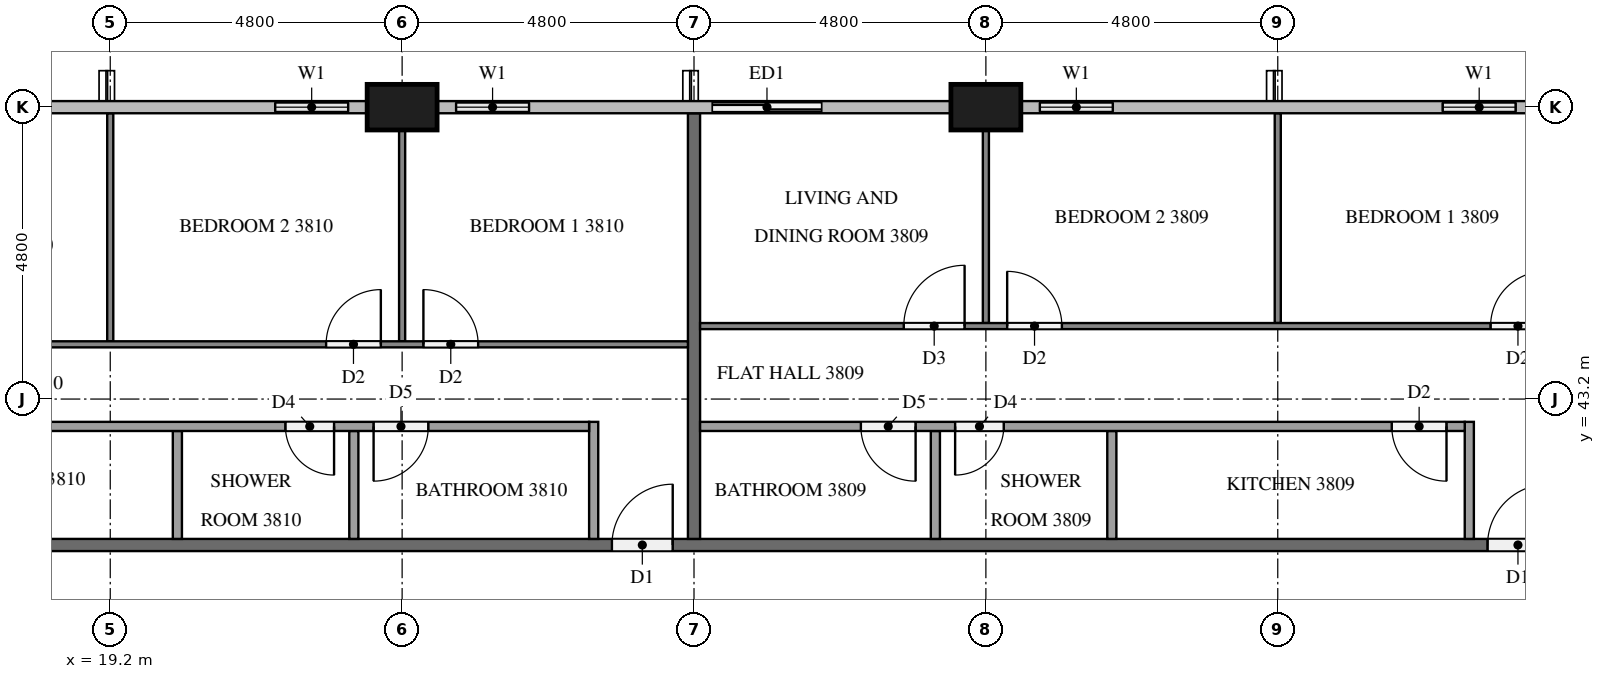
"""IFC4 building model, lengths in metres.
Left out: names, types, materials, properties, quantities, classifications, styles, units other than length and angle.
Written with IfcOpenShell. Run it as: python <this file> out.ifc"""

import sys

from ifc_helpers import new_model, si_unit, direction, frame, frame_2d, origin, origin_2d, place, context, subcontext, project, spatial, rectangle, extrude, element, fill, save


model = new_model("IFC4")
c1 = context("Model", 3, precision=1e-05, world=origin(), true_north=direction((0.0, 1.0)))
c2 = subcontext(c1, "Body", "Model", "MODEL_VIEW")
j1 = project(units=[si_unit("LENGTHUNIT", "METRE"), si_unit("PLANEANGLEUNIT", "RADIAN")], contexts=[c1])
p1 = place(None, origin())
s1 = spatial("IfcSite", under=j1, at=p1, CompositionType="ELEMENT")
p2 = place(p1, origin())
s2 = spatial("IfcBuilding", under=s1, at=p2, CompositionType="ELEMENT")
p3 = place(p2, frame((0.0, 0.0, 149.0)))
s3 = spatial("IfcBuildingStorey", under=s2, at=p3, CompositionType="ELEMENT", Elevation=149.0)
for number, where, z_axis, x_axis in (
    (1, (33.6, 48.0, 0.0), (0.0, 0.0, 1.0), (1.0, 0.0, 0.0)),
    (2, (24.0, 48.0, 0.0), (0.0, 0.0, 1.0), (1.0, 0.0, 0.0)),
):
    element("IfcColumn", number, at=place(p3, frame(where, z_axis=z_axis, x_axis=x_axis)), inside=s3, PredefinedType="COLUMN", context=c2, shape_type="SweptSolid", body=[
        extrude(rectangle(XDim=1.15, YDim=0.75, at=origin_2d()), origin(), (0.0, 0.0, 1.0), 3.2),
    ])
p4 = place(p3, frame((42.625, 48.0, 0.0), z_axis=(0.0, 0.0, 1.0), x_axis=(-1.0, 0.0, 0.0)))
e3 = element("IfcWall", 3, at=p4, inside=s3, PredefinedType="SOLIDWALL", context=c2, shape_type="SweptSolid", body=[
    extrude(rectangle(XDim=1.825, YDim=0.15, at=frame_2d((0.913, 0.0))), origin(), (0.0, 0.0, 1.0), 3.2),
])
p5 = place(p4, frame((0.312, 0.0, 0.9)))
e4 = element("IfcOpeningElement", 4, at=p5, cuts=e3, PredefinedType="OPENING", context=c2, shape_type="SweptSolid", body=[
    extrude(rectangle(XDim=1.2, YDim=1.4, at=frame_2d((0.6, 0.7))), frame((0.0, 0.085, 0.0), z_axis=(0.0, -1.0, 0.0), x_axis=(1.0, 0.0, 0.0)), (0.0, 0.0, 1.0), 0.17),
])
p6 = place(p3, frame((36.0, 48.0, 0.0), z_axis=(0.0, 0.0, 1.0), x_axis=(-1.0, 0.0, 0.0)))
e5 = element("IfcWall", 5, at=p6, inside=s3, PredefinedType="SOLIDWALL", context=c2, shape_type="SweptSolid", body=[
    extrude(rectangle(XDim=1.825, YDim=0.15, at=frame_2d((0.913, 0.0))), origin(), (0.0, 0.0, 1.0), 3.2),
])
p7 = place(p6, frame((0.312, 0.0, 0.9)))
e6 = element("IfcOpeningElement", 6, at=p7, cuts=e5, PredefinedType="OPENING", context=c2, shape_type="SweptSolid", body=[
    extrude(rectangle(XDim=1.2, YDim=1.4, at=frame_2d((0.6, 0.7))), frame((0.0, 0.085, 0.0), z_axis=(0.0, -1.0, 0.0), x_axis=(1.0, 0.0, 0.0)), (0.0, 0.0, 1.0), 0.17),
])
p8 = place(p3, frame((31.2, 48.0, 0.0), z_axis=(0.0, 0.0, 1.0), x_axis=(-1.0, 0.0, 0.0)))
e7 = element("IfcWall", 7, at=p8, inside=s3, PredefinedType="SOLIDWALL", context=c2, shape_type="SweptSolid", body=[
    extrude(rectangle(XDim=2.4, YDim=0.15, at=frame_2d((1.2, 0.0))), origin(), (0.0, 0.0, 1.0), 3.2),
])
p9 = place(p8, frame((0.3, 0.0, 0.0)))
e8 = element("IfcOpeningElement", 8, at=p9, cuts=e7, PredefinedType="OPENING", context=c2, shape_type="SweptSolid", body=[
    extrude(rectangle(XDim=1.8, YDim=2.4, at=frame_2d((0.9, 1.2))), frame((0.0, 0.085, 0.0), z_axis=(0.0, -1.0, 0.0), x_axis=(1.0, 0.0, 0.0)), (0.0, 0.0, 1.0), 0.17),
])
p10 = place(p3, frame((26.4, 48.0, 0.0), z_axis=(0.0, 0.0, 1.0), x_axis=(-1.0, 0.0, 0.0)))
e9 = element("IfcWall", 9, at=p10, inside=s3, PredefinedType="SOLIDWALL", context=c2, shape_type="SweptSolid", body=[
    extrude(rectangle(XDim=1.825, YDim=0.15, at=frame_2d((0.913, 0.0))), origin(), (0.0, 0.0, 1.0), 3.2),
])
p11 = place(p10, frame((0.312, 0.0, 0.9)))
e10 = element("IfcOpeningElement", 10, at=p11, cuts=e9, PredefinedType="OPENING", context=c2, shape_type="SweptSolid", body=[
    extrude(rectangle(XDim=1.2, YDim=1.4, at=frame_2d((0.6, 0.7))), frame((0.0, 0.085, 0.0), z_axis=(0.0, -1.0, 0.0), x_axis=(1.0, 0.0, 0.0)), (0.0, 0.0, 1.0), 0.17),
])
p12 = place(p3, frame((23.425, 48.0, 0.0), z_axis=(0.0, 0.0, 1.0), x_axis=(-1.0, 0.0, 0.0)))
e11 = element("IfcWall", 11, at=p12, inside=s3, PredefinedType="SOLIDWALL", context=c2, shape_type="SweptSolid", body=[
    extrude(rectangle(XDim=1.825, YDim=0.15, at=frame_2d((0.913, 0.0))), origin(), (0.0, 0.0, 1.0), 3.2),
])
p13 = place(p12, frame((0.312, 0.0, 0.9)))
e12 = element("IfcOpeningElement", 12, at=p13, cuts=e11, PredefinedType="OPENING", context=c2, shape_type="SweptSolid", body=[
    extrude(rectangle(XDim=1.2, YDim=1.4, at=frame_2d((0.6, 0.7))), frame((0.0, 0.085, 0.0), z_axis=(0.0, -1.0, 0.0), x_axis=(1.0, 0.0, 0.0)), (0.0, 0.0, 1.0), 0.17),
])
p14 = place(p3, frame((11.9, 40.8, 0.0), z_axis=(0.0, 0.0, 1.0), x_axis=(1.0, 0.0, 0.0)))
e13 = element("IfcWall", 13, at=p14, inside=s3, PredefinedType="PARTITIONING", context=c2, shape_type="SweptSolid", body=[
    extrude(rectangle(XDim=38.6, YDim=0.2, at=frame_2d((19.3, 0.0))), origin(), (0.0, 0.0, 1.0), 3.2),
])
p15 = place(p14, frame((31.65, 0.0, 0.0)))
e14 = element("IfcOpeningElement", 14, at=p15, cuts=e13, PredefinedType="OPENING", context=c2, shape_type="SweptSolid", body=[
    extrude(rectangle(XDim=1.0, YDim=2.1, at=frame_2d((0.5, 1.05))), frame((0.0, 0.11, 0.0), z_axis=(0.0, -1.0, 0.0), x_axis=(1.0, 0.0, 0.0)), (0.0, 0.0, 1.0), 0.22),
])
p16 = place(p14, frame((29.95, 0.0, 0.0)))
e15 = element("IfcOpeningElement", 15, at=p16, cuts=e13, PredefinedType="OPENING", context=c2, shape_type="SweptSolid", body=[
    extrude(rectangle(XDim=1.0, YDim=2.1, at=frame_2d((0.5, 1.05))), frame((0.0, 0.11, 0.0), z_axis=(0.0, -1.0, 0.0), x_axis=(1.0, 0.0, 0.0)), (0.0, 0.0, 1.0), 0.22),
])
p17 = place(p14, frame((15.55, 0.0, 0.0)))
e16 = element("IfcOpeningElement", 16, at=p17, cuts=e13, PredefinedType="OPENING", context=c2, shape_type="SweptSolid", body=[
    extrude(rectangle(XDim=1.0, YDim=2.1, at=frame_2d((0.5, 1.05))), frame((0.0, 0.11, 0.0), z_axis=(0.0, -1.0, 0.0), x_axis=(1.0, 0.0, 0.0)), (0.0, 0.0, 1.0), 0.22),
])
p18 = place(p14, frame((1.15, 0.0, 0.0)))
e17 = element("IfcOpeningElement", 17, at=p18, cuts=e13, PredefinedType="OPENING", context=c2, shape_type="SweptSolid", body=[
    extrude(rectangle(XDim=1.0, YDim=2.1, at=frame_2d((0.5, 1.05))), frame((0.0, 0.11, 0.0), z_axis=(0.0, -1.0, 0.0), x_axis=(1.0, 0.0, 0.0)), (0.0, 0.0, 1.0), 0.22),
])
p19 = place(p3, frame((28.8, 47.9, 0.0), z_axis=(0.0, 0.0, 1.0), x_axis=(0.0, -1.0, 0.0)))
e18 = element("IfcWall", 18, at=p19, inside=s3, PredefinedType="PARTITIONING", context=c2, shape_type="SweptSolid", body=[
    extrude(rectangle(XDim=7.0, YDim=0.2, at=frame_2d((3.5, 0.0))), origin(), (0.0, 0.0, 1.0), 3.2),
])
p20 = place(p3, frame((38.4, 44.45, 0.0), z_axis=(0.0, 0.0, 1.0), x_axis=(0.0, 1.0, 0.0)))
e19 = element("IfcWall", 19, at=p20, inside=s3, PredefinedType="PARTITIONING", context=c2, shape_type="SweptSolid", body=[
    extrude(rectangle(XDim=3.45, YDim=0.1, at=frame_2d((1.725, 0.0))), origin(), (0.0, 0.0, 1.0), 3.2),
])
p21 = place(p3, frame((33.6, 44.45, 0.0), z_axis=(0.0, 0.0, 1.0), x_axis=(0.0, 1.0, 0.0)))
e20 = element("IfcWall", 20, at=p21, inside=s3, PredefinedType="PARTITIONING", context=c2, shape_type="SweptSolid", body=[
    extrude(rectangle(XDim=3.175, YDim=0.1, at=frame_2d((1.587, 0.0))), origin(), (0.0, 0.0, 1.0), 3.2),
])
p22 = place(p3, frame((28.9, 44.4, 0.0), z_axis=(0.0, 0.0, 1.0), x_axis=(1.0, 0.0, 0.0)))
e21 = element("IfcWall", 21, at=p22, inside=s3, PredefinedType="PARTITIONING", context=c2, shape_type="SweptSolid", body=[
    extrude(rectangle(XDim=14.2, YDim=0.1, at=frame_2d((7.1, 0.0))), origin(), (0.0, 0.0, 1.0), 3.2),
])
p23 = place(p22, frame((13.0, 0.0, 0.0)))
e22 = element("IfcOpeningElement", 22, at=p23, cuts=e21, PredefinedType="OPENING", context=c2, shape_type="SweptSolid", body=[
    extrude(rectangle(XDim=0.9, YDim=2.1, at=frame_2d((0.45, 1.05))), frame((0.0, 0.06, 0.0), z_axis=(0.0, -1.0, 0.0), x_axis=(1.0, 0.0, 0.0)), (0.0, 0.0, 1.0), 0.12),
])
p24 = place(p22, frame((5.05, 0.0, 0.0)))
e23 = element("IfcOpeningElement", 23, at=p24, cuts=e21, PredefinedType="OPENING", context=c2, shape_type="SweptSolid", body=[
    extrude(rectangle(XDim=0.9, YDim=2.1, at=frame_2d((0.45, 1.05))), frame((0.0, 0.06, 0.0), z_axis=(0.0, -1.0, 0.0), x_axis=(1.0, 0.0, 0.0)), (0.0, 0.0, 1.0), 0.12),
])
p25 = place(p22, frame((3.35, 0.0, 0.0)))
e24 = element("IfcOpeningElement", 24, at=p25, cuts=e21, PredefinedType="OPENING", context=c2, shape_type="SweptSolid", body=[
    extrude(rectangle(XDim=1.0, YDim=2.1, at=frame_2d((0.5, 1.05))), frame((0.0, 0.06, 0.0), z_axis=(0.0, -1.0, 0.0), x_axis=(1.0, 0.0, 0.0)), (0.0, 0.0, 1.0), 0.12),
])
for number, where, z_axis, x_axis in (
    (25, (35.671, 40.9, 0.0), (0.0, 0.0, 1.0), (0.0, 1.0, 0.0)),
    (26, (32.769, 40.9, 0.0), (0.0, 0.0, 1.0), (0.0, 1.0, 0.0)),
):
    element("IfcWall", number, at=place(p3, frame(where, z_axis=z_axis, x_axis=x_axis)), inside=s3, PredefinedType="PARTITIONING", context=c2, shape_type="SweptSolid", body=[
        extrude(rectangle(XDim=1.775, YDim=0.15, at=frame_2d((0.888, 0.0))), origin(), (0.0, 0.0, 1.0), 3.2),
    ])
p26 = place(p3, frame((41.55, 40.9, 0.0), z_axis=(0.0, 0.0, 1.0), x_axis=(0.0, 1.0, 0.0)))
e27 = element("IfcWall", 27, at=p26, inside=s3, PredefinedType="PARTITIONING", context=c2, shape_type="SweptSolid", body=[
    extrude(rectangle(XDim=1.925, YDim=0.15, at=frame_2d((0.962, 0.0))), origin(), (0.0, 0.0, 1.0), 3.2),
])
p27 = place(p3, frame((41.475, 42.75, 0.0), z_axis=(0.0, 0.0, 1.0), x_axis=(-1.0, 0.0, 0.0)))
e28 = element("IfcWall", 28, at=p27, inside=s3, PredefinedType="PARTITIONING", context=c2, shape_type="SweptSolid", body=[
    extrude(rectangle(XDim=12.575, YDim=0.15, at=frame_2d((6.288, 0.0))), origin(), (0.0, 0.0, 1.0), 3.2),
])
p28 = place(p27, frame((0.3, 0.0, 0.0)))
e29 = element("IfcOpeningElement", 29, at=p28, cuts=e28, PredefinedType="OPENING", context=c2, shape_type="SweptSolid", body=[
    extrude(rectangle(XDim=0.9, YDim=2.1, at=frame_2d((0.45, 1.05))), frame((0.0, 0.085, 0.0), z_axis=(0.0, -1.0, 0.0), x_axis=(1.0, 0.0, 0.0)), (0.0, 0.0, 1.0), 0.17),
])
p29 = place(p27, frame((7.581, 0.0, 0.0)))
e30 = element("IfcOpeningElement", 30, at=p29, cuts=e28, PredefinedType="OPENING", context=c2, shape_type="SweptSolid", body=[
    extrude(rectangle(XDim=0.8, YDim=2.1, at=frame_2d((0.4, 1.05))), frame((0.0, 0.085, 0.0), z_axis=(0.0, -1.0, 0.0), x_axis=(1.0, 0.0, 0.0)), (0.0, 0.0, 1.0), 0.17),
])
p30 = place(p27, frame((9.031, 0.0, 0.0)))
e31 = element("IfcOpeningElement", 31, at=p30, cuts=e28, PredefinedType="OPENING", context=c2, shape_type="SweptSolid", body=[
    extrude(rectangle(XDim=0.9, YDim=2.1, at=frame_2d((0.45, 1.05))), frame((0.0, 0.085, 0.0), z_axis=(0.0, -1.0, 0.0), x_axis=(1.0, 0.0, 0.0)), (0.0, 0.0, 1.0), 0.17),
])
p31 = place(p3, frame((24.0, 44.15, 0.0), z_axis=(0.0, 0.0, 1.0), x_axis=(0.0, 1.0, 0.0)))
e32 = element("IfcWall", 32, at=p31, inside=s3, PredefinedType="PARTITIONING", context=c2, shape_type="SweptSolid", body=[
    extrude(rectangle(XDim=3.475, YDim=0.1, at=frame_2d((1.738, 0.0))), origin(), (0.0, 0.0, 1.0), 3.2),
])
p32 = place(p3, frame((19.2, 44.15, 0.0), z_axis=(0.0, 0.0, 1.0), x_axis=(0.0, 1.0, 0.0)))
e33 = element("IfcWall", 33, at=p32, inside=s3, PredefinedType="PARTITIONING", context=c2, shape_type="SweptSolid", body=[
    extrude(rectangle(XDim=3.75, YDim=0.1, at=frame_2d((1.875, 0.0))), origin(), (0.0, 0.0, 1.0), 3.2),
])
p33 = place(p3, frame((14.5, 44.1, 0.0), z_axis=(0.0, 0.0, 1.0), x_axis=(1.0, 0.0, 0.0)))
e34 = element("IfcWall", 34, at=p33, inside=s3, PredefinedType="PARTITIONING", context=c2, shape_type="SweptSolid", body=[
    extrude(rectangle(XDim=14.2, YDim=0.1, at=frame_2d((7.1, 0.0))), origin(), (0.0, 0.0, 1.0), 3.2),
])
p34 = place(p33, frame((9.85, 0.0, 0.0)))
e35 = element("IfcOpeningElement", 35, at=p34, cuts=e34, PredefinedType="OPENING", context=c2, shape_type="SweptSolid", body=[
    extrude(rectangle(XDim=0.9, YDim=2.1, at=frame_2d((0.45, 1.05))), frame((0.0, 0.06, 0.0), z_axis=(0.0, -1.0, 0.0), x_axis=(1.0, 0.0, 0.0)), (0.0, 0.0, 1.0), 0.12),
])
p35 = place(p33, frame((8.25, 0.0, 0.0)))
e36 = element("IfcOpeningElement", 36, at=p35, cuts=e34, PredefinedType="OPENING", context=c2, shape_type="SweptSolid", body=[
    extrude(rectangle(XDim=0.9, YDim=2.1, at=frame_2d((0.45, 1.05))), frame((0.0, 0.06, 0.0), z_axis=(0.0, -1.0, 0.0), x_axis=(1.0, 0.0, 0.0)), (0.0, 0.0, 1.0), 0.12),
])
p36 = place(p33, frame((0.3, 0.0, 0.0)))
e37 = element("IfcOpeningElement", 37, at=p36, cuts=e34, PredefinedType="OPENING", context=c2, shape_type="SweptSolid", body=[
    extrude(rectangle(XDim=1.0, YDim=2.1, at=frame_2d((0.5, 1.05))), frame((0.0, 0.06, 0.0), z_axis=(0.0, -1.0, 0.0), x_axis=(1.0, 0.0, 0.0)), (0.0, 0.0, 1.0), 0.12),
])
for number, where, z_axis, x_axis in (
    (38, (23.206, 40.9, 0.0), (0.0, 0.0, 1.0), (0.0, 1.0, 0.0)),
    (39, (20.304, 40.9, 0.0), (0.0, 0.0, 1.0), (0.0, 1.0, 0.0)),
):
    element("IfcWall", number, at=place(p3, frame(where, z_axis=z_axis, x_axis=x_axis)), inside=s3, PredefinedType="PARTITIONING", context=c2, shape_type="SweptSolid", body=[
        extrude(rectangle(XDim=1.775, YDim=0.15, at=frame_2d((0.888, 0.0))), origin(), (0.0, 0.0, 1.0), 3.2),
    ])
p37 = place(p3, frame((27.15, 40.9, 0.0), z_axis=(0.0, 0.0, 1.0), x_axis=(0.0, 1.0, 0.0)))
e40 = element("IfcWall", 40, at=p37, inside=s3, PredefinedType="PARTITIONING", context=c2, shape_type="SweptSolid", body=[
    extrude(rectangle(XDim=1.925, YDim=0.15, at=frame_2d((0.962, 0.0))), origin(), (0.0, 0.0, 1.0), 3.2),
])
p38 = place(p3, frame((27.075, 42.75, 0.0), z_axis=(0.0, 0.0, 1.0), x_axis=(-1.0, 0.0, 0.0)))
e41 = element("IfcWall", 41, at=p38, inside=s3, PredefinedType="PARTITIONING", context=c2, shape_type="SweptSolid", body=[
    extrude(rectangle(XDim=12.575, YDim=0.15, at=frame_2d((6.288, 0.0))), origin(), (0.0, 0.0, 1.0), 3.2),
])
p39 = place(p38, frame((2.644, 0.0, 0.0)))
e42 = element("IfcOpeningElement", 42, at=p39, cuts=e41, PredefinedType="OPENING", context=c2, shape_type="SweptSolid", body=[
    extrude(rectangle(XDim=0.9, YDim=2.1, at=frame_2d((0.45, 1.05))), frame((0.0, 0.085, 0.0), z_axis=(0.0, -1.0, 0.0), x_axis=(1.0, 0.0, 0.0)), (0.0, 0.0, 1.0), 0.17),
])
p40 = place(p38, frame((4.194, 0.0, 0.0)))
e43 = element("IfcOpeningElement", 43, at=p40, cuts=e41, PredefinedType="OPENING", context=c2, shape_type="SweptSolid", body=[
    extrude(rectangle(XDim=0.8, YDim=2.1, at=frame_2d((0.4, 1.05))), frame((0.0, 0.085, 0.0), z_axis=(0.0, -1.0, 0.0), x_axis=(1.0, 0.0, 0.0)), (0.0, 0.0, 1.0), 0.17),
])
p41 = place(p38, frame((11.325, 0.0, 0.0)))
e44 = element("IfcOpeningElement", 44, at=p41, cuts=e41, PredefinedType="OPENING", context=c2, shape_type="SweptSolid", body=[
    extrude(rectangle(XDim=0.9, YDim=2.1, at=frame_2d((0.45, 1.05))), frame((0.0, 0.085, 0.0), z_axis=(0.0, -1.0, 0.0), x_axis=(1.0, 0.0, 0.0)), (0.0, 0.0, 1.0), 0.17),
])
p42 = place(p5, origin())
e45 = element("IfcWindow", 45, at=p42, inside=s3, PartitioningType="SINGLE_PANEL", PredefinedType="WINDOW", context=c2, shape_type="SweptSolid", body=[
    extrude(rectangle(XDim=1.2, YDim=1.4, at=frame_2d((0.6, 0.7))), frame((0.0, 0.03, 0.0), z_axis=(0.0, -1.0, 0.0), x_axis=(1.0, 0.0, 0.0)), (0.0, 0.0, 1.0), 0.06),
])
fill(e4, e45)
p43 = place(p7, origin())
e46 = element("IfcWindow", 46, at=p43, inside=s3, PartitioningType="SINGLE_PANEL", PredefinedType="WINDOW", context=c2, shape_type="SweptSolid", body=[
    extrude(rectangle(XDim=1.2, YDim=1.4, at=frame_2d((0.6, 0.7))), frame((0.0, 0.03, 0.0), z_axis=(0.0, -1.0, 0.0), x_axis=(1.0, 0.0, 0.0)), (0.0, 0.0, 1.0), 0.06),
])
fill(e6, e46)
p44 = place(p9, origin())
e47 = element("IfcDoor", 47, at=p44, inside=s3, OperationType="SLIDING_TO_LEFT", PredefinedType="DOOR", context=c2, shape_type="SweptSolid", body=[
    extrude(rectangle(XDim=1.8, YDim=2.4, at=frame_2d((0.9, 1.2))), frame((0.0, 0.025, 0.0), z_axis=(0.0, -1.0, 0.0), x_axis=(1.0, 0.0, 0.0)), (0.0, 0.0, 1.0), 0.05),
])
fill(e8, e47)
p45 = place(p11, origin())
e48 = element("IfcWindow", 48, at=p45, inside=s3, PartitioningType="SINGLE_PANEL", PredefinedType="WINDOW", context=c2, shape_type="SweptSolid", body=[
    extrude(rectangle(XDim=1.2, YDim=1.4, at=frame_2d((0.6, 0.7))), frame((0.0, 0.03, 0.0), z_axis=(0.0, -1.0, 0.0), x_axis=(1.0, 0.0, 0.0)), (0.0, 0.0, 1.0), 0.06),
])
fill(e10, e48)
p46 = place(p13, origin())
e49 = element("IfcWindow", 49, at=p46, inside=s3, PartitioningType="SINGLE_PANEL", PredefinedType="WINDOW", context=c2, shape_type="SweptSolid", body=[
    extrude(rectangle(XDim=1.2, YDim=1.4, at=frame_2d((0.6, 0.7))), frame((0.0, 0.03, 0.0), z_axis=(0.0, -1.0, 0.0), x_axis=(1.0, 0.0, 0.0)), (0.0, 0.0, 1.0), 0.06),
])
fill(e12, e49)
p47 = place(p16, origin())
e50 = element("IfcDoor", 50, at=p47, inside=s3, OperationType="SINGLE_SWING_RIGHT", PredefinedType="DOOR", context=c2, shape_type="SweptSolid", body=[
    extrude(rectangle(XDim=1.0, YDim=2.1, at=frame_2d((0.5, 1.05))), frame((0.0, 0.025, 0.0), z_axis=(0.0, -1.0, 0.0), x_axis=(1.0, 0.0, 0.0)), (0.0, 0.0, 1.0), 0.05),
])
fill(e15, e50)
p48 = place(p17, origin())
e51 = element("IfcDoor", 51, at=p48, inside=s3, OperationType="SINGLE_SWING_RIGHT", PredefinedType="DOOR", context=c2, shape_type="SweptSolid", body=[
    extrude(rectangle(XDim=1.0, YDim=2.1, at=frame_2d((0.5, 1.05))), frame((0.0, 0.025, 0.0), z_axis=(0.0, -1.0, 0.0), x_axis=(1.0, 0.0, 0.0)), (0.0, 0.0, 1.0), 0.05),
])
fill(e16, e51)
p49 = place(p23, origin())
e52 = element("IfcDoor", 52, at=p49, inside=s3, OperationType="SINGLE_SWING_RIGHT", PredefinedType="DOOR", context=c2, shape_type="SweptSolid", body=[
    extrude(rectangle(XDim=0.9, YDim=2.1, at=frame_2d((0.45, 1.05))), frame((0.0, 0.025, 0.0), z_axis=(0.0, -1.0, 0.0), x_axis=(1.0, 0.0, 0.0)), (0.0, 0.0, 1.0), 0.05),
])
fill(e22, e52)
p50 = place(p24, origin())
e53 = element("IfcDoor", 53, at=p50, inside=s3, OperationType="SINGLE_SWING_LEFT", PredefinedType="DOOR", context=c2, shape_type="SweptSolid", body=[
    extrude(rectangle(XDim=0.9, YDim=2.1, at=frame_2d((0.45, 1.05))), frame((0.0, 0.025, 0.0), z_axis=(0.0, -1.0, 0.0), x_axis=(1.0, 0.0, 0.0)), (0.0, 0.0, 1.0), 0.05),
])
fill(e23, e53)
p51 = place(p25, origin())
e54 = element("IfcDoor", 54, at=p51, inside=s3, OperationType="SINGLE_SWING_RIGHT", PredefinedType="DOOR", context=c2, shape_type="SweptSolid", body=[
    extrude(rectangle(XDim=1.0, YDim=2.1, at=frame_2d((0.5, 1.05))), frame((0.0, 0.025, 0.0), z_axis=(0.0, -1.0, 0.0), x_axis=(1.0, 0.0, 0.0)), (0.0, 0.0, 1.0), 0.05),
])
fill(e24, e54)
p52 = place(p28, origin())
e55 = element("IfcDoor", 55, at=p52, inside=s3, OperationType="SINGLE_SWING_LEFT", PredefinedType="DOOR", context=c2, shape_type="SweptSolid", body=[
    extrude(rectangle(XDim=0.9, YDim=2.1, at=frame_2d((0.45, 1.05))), frame((0.0, 0.025, 0.0), z_axis=(0.0, -1.0, 0.0), x_axis=(1.0, 0.0, 0.0)), (0.0, 0.0, 1.0), 0.05),
])
fill(e29, e55)
p53 = place(p29, origin())
e56 = element("IfcDoor", 56, at=p53, inside=s3, OperationType="SINGLE_SWING_RIGHT", PredefinedType="DOOR", context=c2, shape_type="SweptSolid", body=[
    extrude(rectangle(XDim=0.8, YDim=2.1, at=frame_2d((0.4, 1.05))), frame((0.0, 0.025, 0.0), z_axis=(0.0, -1.0, 0.0), x_axis=(1.0, 0.0, 0.0)), (0.0, 0.0, 1.0), 0.05),
])
fill(e30, e56)
p54 = place(p30, origin())
e57 = element("IfcDoor", 57, at=p54, inside=s3, OperationType="SINGLE_SWING_LEFT", PredefinedType="DOOR", context=c2, shape_type="SweptSolid", body=[
    extrude(rectangle(XDim=0.9, YDim=2.1, at=frame_2d((0.45, 1.05))), frame((0.0, 0.025, 0.0), z_axis=(0.0, -1.0, 0.0), x_axis=(1.0, 0.0, 0.0)), (0.0, 0.0, 1.0), 0.05),
])
fill(e31, e57)
p55 = place(p34, origin())
e58 = element("IfcDoor", 58, at=p55, inside=s3, OperationType="SINGLE_SWING_LEFT", PredefinedType="DOOR", context=c2, shape_type="SweptSolid", body=[
    extrude(rectangle(XDim=0.9, YDim=2.1, at=frame_2d((0.45, 1.05))), frame((0.0, 0.025, 0.0), z_axis=(0.0, -1.0, 0.0), x_axis=(1.0, 0.0, 0.0)), (0.0, 0.0, 1.0), 0.05),
])
fill(e35, e58)
p56 = place(p35, origin())
e59 = element("IfcDoor", 59, at=p56, inside=s3, OperationType="SINGLE_SWING_RIGHT", PredefinedType="DOOR", context=c2, shape_type="SweptSolid", body=[
    extrude(rectangle(XDim=0.9, YDim=2.1, at=frame_2d((0.45, 1.05))), frame((0.0, 0.025, 0.0), z_axis=(0.0, -1.0, 0.0), x_axis=(1.0, 0.0, 0.0)), (0.0, 0.0, 1.0), 0.05),
])
fill(e36, e59)
p57 = place(p39, origin())
e60 = element("IfcDoor", 60, at=p57, inside=s3, OperationType="SINGLE_SWING_RIGHT", PredefinedType="DOOR", context=c2, shape_type="SweptSolid", body=[
    extrude(rectangle(XDim=0.9, YDim=2.1, at=frame_2d((0.45, 1.05))), frame((0.0, 0.025, 0.0), z_axis=(0.0, -1.0, 0.0), x_axis=(1.0, 0.0, 0.0)), (0.0, 0.0, 1.0), 0.05),
])
fill(e42, e60)
p58 = place(p40, origin())
e61 = element("IfcDoor", 61, at=p58, inside=s3, OperationType="SINGLE_SWING_LEFT", PredefinedType="DOOR", context=c2, shape_type="SweptSolid", body=[
    extrude(rectangle(XDim=0.8, YDim=2.1, at=frame_2d((0.4, 1.05))), frame((0.0, 0.025, 0.0), z_axis=(0.0, -1.0, 0.0), x_axis=(1.0, 0.0, 0.0)), (0.0, 0.0, 1.0), 0.05),
])
fill(e43, e61)
save(model, sys.argv[1])
